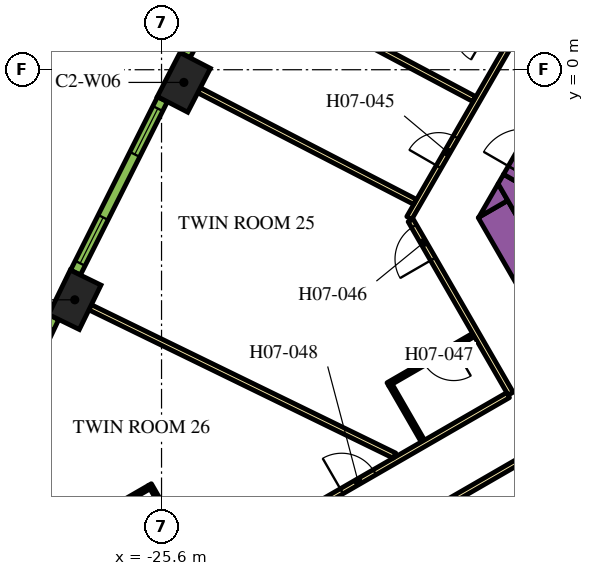
"""IFC4 building model, lengths in metres.
Left out: names, types, materials, properties, quantities, classifications, styles, units other than length and angle.
Written with IfcOpenShell. Run it as: python <this file> out.ifc"""

import sys

from ifc_helpers import new_model, si_unit, direction, frame, frame_2d, origin, origin_2d, place, context, subcontext, project, spatial, polyline, rectangle, outline, extrude, element, fill, save


model = new_model("IFC4")
c1 = context("Model", 3, precision=1e-05, world=origin(), true_north=direction((0.0, 1.0)))
c2 = subcontext(c1, "Body", "Model", "MODEL_VIEW")
j1 = project(units=[si_unit("LENGTHUNIT", "METRE"), si_unit("PLANEANGLEUNIT", "RADIAN")], contexts=[c1])
p1 = place(None, origin())
s1 = spatial("IfcSite", under=j1, at=p1, CompositionType="ELEMENT")
p2 = place(p1, origin())
s2 = spatial("IfcBuilding", under=s1, at=p2, CompositionType="ELEMENT")
p3 = place(p2, frame((0.0, 0.0, 95.4)))
s3 = spatial("IfcBuildingStorey", under=s2, at=p3, CompositionType="ELEMENT", Elevation=95.4)
for number, where, z_axis, x_axis in (
    (1, (-25.012, -0.334, 0.0), (0.0, 0.0, 1.0), (-0.459, -0.888, 0.0)),
    (2, (-27.883, -6.054, 0.0), (0.0, 0.0, 1.0), (-0.438, -0.899, 0.0)),
):
    element("IfcColumn", number, at=place(p3, frame(where, z_axis=z_axis, x_axis=x_axis)), inside=s3, PredefinedType="COLUMN", context=c2, shape_type="SweptSolid", body=[
        extrude(rectangle(XDim=1.3, YDim=0.9, at=origin_2d()), origin(), (0.0, 0.0, 1.0), 3.9),
    ])
p4 = place(p3, frame((-12.134, -11.883, 0.0), z_axis=(0.0, 0.0, 1.0), x_axis=(-0.500005339912, 0.866022320763, 0.0)))
e3 = element("IfcWall", 3, at=p4, inside=s3, PredefinedType="SOLIDWALL", context=c2, shape_type="SweptSolid", body=[
    extrude(rectangle(XDim=9.488, YDim=0.9, at=frame_2d((4.744, 0.0))), origin(), (0.0, 0.0, 1.0), 3.9),
])
p5 = place(p3, origin())
e4 = element("IfcWall", 4, at=p5, inside=s3, PredefinedType="SOLIDWALL", context=c2, shape_type="SweptSolid", body=[
    extrude(outline(polyline([(-16.489, -3.44), (-17.251, -3.88), (-16.743, -3.0), (-16.489, -3.44)])), origin(), (0.0, 0.0, 1.0), 3.9),
])
e5 = element("IfcWall", 5, at=p5, inside=s3, PredefinedType="SOLIDWALL", context=c2, shape_type="SweptSolid", body=[
    extrude(outline(polyline([(-15.82, -3.201), (-16.223, -3.9), (-16.743, -3.0), (-16.599, -2.751), (-15.82, -3.201)])), origin(), (0.0, 0.0, 1.0), 3.9),
])
p6 = place(p3, frame((-16.209, -2.976, 0.0), z_axis=(0.0, 0.0, 1.0), x_axis=(0.499954529098, 0.86605165483, 0.0)))
e6 = element("IfcWall", 6, at=p6, inside=s3, PredefinedType="SOLIDWALL", context=c2, shape_type="SweptSolid", body=[
    extrude(rectangle(XDim=1.7, YDim=0.9, at=frame_2d((0.85, 0.0))), origin(), (0.0, 0.0, 1.0), 3.9),
])
p7 = place(p6, frame((0.25, 0.0, 0.0)))
e7 = element("IfcOpeningElement", 7, at=p7, cuts=e6, PredefinedType="OPENING", context=c2, shape_type="SweptSolid", body=[
    extrude(rectangle(XDim=1.2, YDim=2.1, at=frame_2d((0.6, 1.05))), frame((0.0, 0.46, 0.0), z_axis=(0.0, -1.0, 0.0), x_axis=(1.0, 0.0, 0.0)), (0.0, 0.0, 1.0), 0.92),
])
p8 = place(p3, frame((-19.081, -3.9, 0.0), z_axis=(0.0, 0.0, 1.0), x_axis=(0.499998313975, 0.866026377209, 0.0)))
e8 = element("IfcWall", 8, at=p8, inside=s3, PredefinedType="PARTITIONING", context=c2, shape_type="SweptSolid", body=[
    extrude(rectangle(XDim=25.766, YDim=0.15, at=frame_2d((12.883, 0.0))), origin(), (0.0, 0.0, 1.0), 2.75),
])
p9 = place(p8, frame((19.306, 0.0, 0.0)))
e9 = element("IfcOpeningElement", 9, at=p9, cuts=e8, PredefinedType="OPENING", context=c2, shape_type="SweptSolid", body=[
    extrude(rectangle(XDim=1.0, YDim=2.1, at=frame_2d((0.5, 1.05))), frame((0.0, 0.085, 0.0), z_axis=(0.0, -1.0, 0.0), x_axis=(1.0, 0.0, 0.0)), (0.0, 0.0, 1.0), 0.17),
])
p10 = place(p8, frame((17.144, 0.0, 0.0)))
e10 = element("IfcOpeningElement", 10, at=p10, cuts=e8, PredefinedType="OPENING", context=c2, shape_type="SweptSolid", body=[
    extrude(rectangle(XDim=0.9, YDim=2.1, at=frame_2d((0.45, 1.05))), frame((0.0, 0.085, 0.0), z_axis=(0.0, -1.0, 0.0), x_axis=(1.0, 0.0, 0.0)), (0.0, 0.0, 1.0), 0.17),
])
p11 = place(p8, frame((9.955, 0.0, 0.0)))
e11 = element("IfcOpeningElement", 11, at=p11, cuts=e8, PredefinedType="OPENING", context=c2, shape_type="SweptSolid", body=[
    extrude(rectangle(XDim=1.1, YDim=2.1, at=frame_2d((0.55, 1.05))), frame((0.0, 0.085, 0.0), z_axis=(0.0, -1.0, 0.0), x_axis=(1.0, 0.0, 0.0)), (0.0, 0.0, 1.0), 0.17),
])
p12 = place(p8, frame((8.648, 0.0, 0.0)))
e12 = element("IfcOpeningElement", 12, at=p12, cuts=e8, PredefinedType="OPENING", context=c2, shape_type="SweptSolid", body=[
    extrude(rectangle(XDim=1.0, YDim=2.1, at=frame_2d((0.5, 1.05))), frame((0.0, 0.085, 0.0), z_axis=(0.0, -1.0, 0.0), x_axis=(1.0, 0.0, 0.0)), (0.0, 0.0, 1.0), 0.17),
])
p13 = place(p8, frame((1.553, 0.0, 0.0)))
e13 = element("IfcOpeningElement", 13, at=p13, cuts=e8, PredefinedType="OPENING", context=c2, shape_type="SweptSolid", body=[
    extrude(rectangle(XDim=0.9, YDim=2.1, at=frame_2d((0.45, 1.05))), frame((0.0, 0.085, 0.0), z_axis=(0.0, -1.0, 0.0), x_axis=(1.0, 0.0, 0.0)), (0.0, 0.0, 1.0), 0.17),
])
p14 = place(p3, frame((-16.412, -8.523, 0.0), z_axis=(0.0, 0.0, 1.0), x_axis=(-0.500001929737, 0.866024289647, 0.0)))
e14 = element("IfcWall", 14, at=p14, inside=s3, PredefinedType="PARTITIONING", context=c2, shape_type="SweptSolid", body=[
    extrude(rectangle(XDim=5.268, YDim=0.15, at=frame_2d((2.634, 0.0))), origin(), (0.0, 0.0, 1.0), 2.75),
])
p15 = place(p14, frame((4.088, 0.0, 0.0)))
e15 = element("IfcOpeningElement", 15, at=p15, cuts=e14, PredefinedType="OPENING", context=c2, shape_type="SweptSolid", body=[
    extrude(rectangle(XDim=1.0, YDim=2.1, at=frame_2d((0.5, 1.05))), frame((0.0, 0.085, 0.0), z_axis=(0.0, -1.0, 0.0), x_axis=(1.0, 0.0, 0.0)), (0.0, 0.0, 1.0), 0.17),
])
p16 = place(p3, frame((-28.211, -15.335, 0.0), z_axis=(0.0, 0.0, 1.0), x_axis=(0.866025884867, 0.49999916674, 0.0)))
e16 = element("IfcWall", 16, at=p16, inside=s3, PredefinedType="PARTITIONING", context=c2, shape_type="SweptSolid", body=[
    extrude(rectangle(XDim=13.543, YDim=0.15, at=frame_2d((6.772, 0.0))), origin(), (0.0, 0.0, 1.0), 2.75),
])
p17 = place(p16, frame((8.488, 0.0, 0.0)))
e17 = element("IfcOpeningElement", 17, at=p17, cuts=e16, PredefinedType="OPENING", context=c2, shape_type="SweptSolid", body=[
    extrude(rectangle(XDim=1.0, YDim=2.1, at=frame_2d((0.5, 1.05))), frame((0.0, 0.085, 0.0), z_axis=(0.0, -1.0, 0.0), x_axis=(1.0, 0.0, 0.0)), (0.0, 0.0, 1.0), 0.17),
])
p18 = place(p3, frame((-15.587, -9.952, 0.0), z_axis=(0.0, 0.0, 1.0), x_axis=(-0.866017869832, -0.500013048961, 0.0)))
e18 = element("IfcWall", 18, at=p18, inside=s3, PredefinedType="PARTITIONING", context=c2, shape_type="SweptSolid", body=[
    extrude(rectangle(XDim=13.624, YDim=0.15, at=frame_2d((6.812, 0.0))), origin(), (0.0, 0.0, 1.0), 2.75),
])
p19 = place(p18, frame((4.134, 0.0, 0.0)))
e19 = element("IfcOpeningElement", 19, at=p19, cuts=e18, PredefinedType="OPENING", context=c2, shape_type="SweptSolid", body=[
    extrude(rectangle(XDim=1.0, YDim=2.1, at=frame_2d((0.5, 1.05))), frame((0.0, 0.085, 0.0), z_axis=(0.0, -1.0, 0.0), x_axis=(1.0, 0.0, 0.0)), (0.0, 0.0, 1.0), 0.17),
])
p20 = place(p3, frame((-27.479, -6.251, 0.0), z_axis=(0.0, 0.0, 1.0), x_axis=(0.898945877276, -0.438059710231, 0.0)))
e20 = element("IfcWall", 20, at=p20, inside=s3, PredefinedType="PARTITIONING", context=c2, shape_type="SweptSolid", body=[
    extrude(rectangle(XDim=8.909, YDim=0.15, at=frame_2d((4.455, 0.0))), origin(), (0.0, 0.0, 1.0), 2.75),
])
p21 = place(p3, frame((-24.613, -0.541, 0.0), z_axis=(0.0, 0.0, 1.0), x_axis=(0.888459912519, -0.458954228487, 0.0)))
e21 = element("IfcWall", 21, at=p21, inside=s3, PredefinedType="PARTITIONING", context=c2, shape_type="SweptSolid", body=[
    extrude(rectangle(XDim=6.392, YDim=0.15, at=frame_2d((3.196, 0.0))), origin(), (0.0, 0.0, 1.0), 2.75),
])
p22 = place(p3, frame((-23.652, 2.567, 0.0), z_axis=(0.0, 0.0, 1.0), x_axis=(0.883019237957, -0.469336793144, 0.0)))
e22 = element("IfcWall", 22, at=p22, inside=s3, PredefinedType="PARTITIONING", context=c2, shape_type="SweptSolid", body=[
    extrude(rectangle(XDim=7.111, YDim=0.15, at=frame_2d((3.555, 0.0))), origin(), (0.0, 0.0, 1.0), 2.75),
])
p23 = place(p3, frame((-17.39, -6.979, 0.0), z_axis=(0.0, 0.0, 1.0), x_axis=(-0.866021400173, -0.500006934395, 0.0)))
e23 = element("IfcWall", 23, at=p23, inside=s3, PredefinedType="PARTITIONING", context=c2, shape_type="SweptSolid", body=[
    extrude(rectangle(XDim=2.6, YDim=0.1, at=frame_2d((1.3, 0.0))), origin(), (0.0, 0.0, 1.0), 2.75),
])
p24 = place(p23, frame((0.6, 0.0, 0.0)))
e24 = element("IfcOpeningElement", 24, at=p24, cuts=e23, PredefinedType="OPENING", context=c2, shape_type="SweptSolid", body=[
    extrude(rectangle(XDim=0.9, YDim=2.1, at=frame_2d((0.45, 1.05))), frame((0.0, 0.06, 0.0), z_axis=(0.0, -1.0, 0.0), x_axis=(1.0, 0.0, 0.0)), (0.0, 0.0, 1.0), 0.12),
])
p25 = place(p3, frame((-19.574, -8.297, 0.0), z_axis=(0.0, 0.0, 1.0), x_axis=(0.500062241894, -0.865989465428, 0.0)))
e25 = element("IfcWall", 25, at=p25, inside=s3, PredefinedType="PARTITIONING", context=c2, shape_type="SweptSolid", body=[
    extrude(rectangle(XDim=1.7, YDim=0.1, at=frame_2d((0.85, 0.0))), origin(), (0.0, 0.0, 1.0), 2.75),
])
p26 = place(p3, frame((-24.61, -13.169, 0.0), z_axis=(0.0, 0.0, 1.0), x_axis=(-0.500006934395, 0.866021400173, 0.0)))
e26 = element("IfcWall", 26, at=p26, inside=s3, PredefinedType="PARTITIONING", context=c2, shape_type="SweptSolid", body=[
    extrude(rectangle(XDim=2.6, YDim=0.1, at=frame_2d((1.3, 0.0))), origin(), (0.0, 0.0, 1.0), 2.75),
])
p27 = place(p26, frame((0.6, 0.0, 0.0)))
e27 = element("IfcOpeningElement", 27, at=p27, cuts=e26, PredefinedType="OPENING", context=c2, shape_type="SweptSolid", body=[
    extrude(rectangle(XDim=0.9, YDim=2.1, at=frame_2d((0.45, 1.05))), frame((0.0, 0.06, 0.0), z_axis=(0.0, -1.0, 0.0), x_axis=(1.0, 0.0, 0.0)), (0.0, 0.0, 1.0), 0.12),
])
p28 = place(p3, frame((-25.928, -10.986, 0.0), z_axis=(0.0, 0.0, 1.0), x_axis=(-0.865989465428, -0.500062241894, 0.0)))
e28 = element("IfcWall", 28, at=p28, inside=s3, PredefinedType="PARTITIONING", context=c2, shape_type="SweptSolid", body=[
    extrude(rectangle(XDim=1.7, YDim=0.1, at=frame_2d((0.85, 0.0))), origin(), (0.0, 0.0, 1.0), 2.75),
])
p29 = place(p3, frame((-22.583, 4.887, 0.0), z_axis=(0.0, 0.0, 1.0), x_axis=(-0.469323203119, -0.883026461106, 0.0)))
e29 = element("IfcWall", 29, at=p29, inside=s3, PredefinedType="SOLIDWALL", context=c2, shape_type="SweptSolid", body=[
    extrude(rectangle(XDim=5.101, YDim=0.29, at=frame_2d((2.55, 0.0))), origin(), (0.0, 0.0, 1.0), 3.65),
])
p30 = place(p29, frame((0.273, 0.0, 0.9)))
e30 = element("IfcOpeningElement", 30, at=p30, cuts=e29, PredefinedType="OPENING", context=c2, shape_type="SweptSolid", body=[
    extrude(rectangle(XDim=1.35, YDim=2.15, at=frame_2d((0.675, 1.075))), frame((0.0, 0.155, 0.0), z_axis=(0.0, -1.0, 0.0), x_axis=(1.0, 0.0, 0.0)), (0.0, 0.0, 1.0), 0.31),
])
p31 = place(p29, frame((3.478, 0.0, 0.9)))
e31 = element("IfcOpeningElement", 31, at=p31, cuts=e29, PredefinedType="OPENING", context=c2, shape_type="SweptSolid", body=[
    extrude(rectangle(XDim=1.35, YDim=2.15, at=frame_2d((0.675, 1.075))), frame((0.0, 0.155, 0.0), z_axis=(0.0, -1.0, 0.0), x_axis=(1.0, 0.0, 0.0)), (0.0, 0.0, 1.0), 0.31),
])
p32 = place(p3, frame((-25.576, -0.778, 0.0), z_axis=(0.0, 0.0, 1.0), x_axis=(-0.448534297211, -0.893765620409, 0.0)))
e32 = element("IfcWall", 32, at=p32, inside=s3, PredefinedType="SOLIDWALL", context=c2, shape_type="SweptSolid", body=[
    extrude(rectangle(XDim=5.1, YDim=0.29, at=frame_2d((2.55, 0.0))), origin(), (0.0, 0.0, 1.0), 3.65),
])
p33 = place(p32, frame((0.272, 0.0, 0.9)))
e33 = element("IfcOpeningElement", 33, at=p33, cuts=e32, PredefinedType="OPENING", context=c2, shape_type="SweptSolid", body=[
    extrude(rectangle(XDim=1.35, YDim=2.15, at=frame_2d((0.675, 1.075))), frame((0.0, 0.155, 0.0), z_axis=(0.0, -1.0, 0.0), x_axis=(1.0, 0.0, 0.0)), (0.0, 0.0, 1.0), 0.31),
])
p34 = place(p32, frame((3.478, 0.0, 0.9)))
e34 = element("IfcOpeningElement", 34, at=p34, cuts=e32, PredefinedType="OPENING", context=c2, shape_type="SweptSolid", body=[
    extrude(rectangle(XDim=1.35, YDim=2.15, at=frame_2d((0.675, 1.075))), frame((0.0, 0.155, 0.0), z_axis=(0.0, -1.0, 0.0), x_axis=(1.0, 0.0, 0.0)), (0.0, 0.0, 1.0), 0.31),
])
p35 = place(p3, frame((-28.436, -6.511, 0.0), z_axis=(0.0, 0.0, 1.0), x_axis=(-0.427543726596, -0.903994669148, 0.0)))
e35 = element("IfcWall", 35, at=p35, inside=s3, PredefinedType="SOLIDWALL", context=c2, shape_type="SweptSolid", body=[
    extrude(rectangle(XDim=5.107, YDim=0.29, at=frame_2d((2.553, 0.0))), origin(), (0.0, 0.0, 1.0), 3.65),
])
p36 = place(p35, frame((0.285, 0.0, 0.9)))
e36 = element("IfcOpeningElement", 36, at=p36, cuts=e35, PredefinedType="OPENING", context=c2, shape_type="SweptSolid", body=[
    extrude(rectangle(XDim=1.35, YDim=2.15, at=frame_2d((0.675, 1.075))), frame((0.0, 0.155, 0.0), z_axis=(0.0, -1.0, 0.0), x_axis=(1.0, 0.0, 0.0)), (0.0, 0.0, 1.0), 0.31),
])
p37 = place(p35, frame((3.516, 0.0, 0.9)))
e37 = element("IfcOpeningElement", 37, at=p37, cuts=e35, PredefinedType="OPENING", context=c2, shape_type="SweptSolid", body=[
    extrude(rectangle(XDim=1.35, YDim=2.15, at=frame_2d((0.675, 1.075))), frame((0.0, 0.155, 0.0), z_axis=(0.0, -1.0, 0.0), x_axis=(1.0, 0.0, 0.0)), (0.0, 0.0, 1.0), 0.31),
])
p38 = place(p13, origin())
e38 = element("IfcDoor", 38, at=p38, inside=s3, OperationType="SINGLE_SWING_RIGHT", PredefinedType="DOOR", context=c2, shape_type="SweptSolid", body=[
    extrude(rectangle(XDim=0.9, YDim=2.1, at=frame_2d((0.45, 1.05))), frame((0.0, 0.025, 0.0), z_axis=(0.0, -1.0, 0.0), x_axis=(1.0, 0.0, 0.0)), (0.0, 0.0, 1.0), 0.05),
])
fill(e13, e38)
p39 = place(p15, origin())
e39 = element("IfcDoor", 39, at=p39, inside=s3, OperationType="SINGLE_SWING_RIGHT", PredefinedType="DOOR", context=c2, shape_type="SweptSolid", body=[
    extrude(rectangle(XDim=1.0, YDim=2.1, at=frame_2d((0.5, 1.05))), frame((0.0, 0.025, 0.0), z_axis=(0.0, -1.0, 0.0), x_axis=(1.0, 0.0, 0.0)), (0.0, 0.0, 1.0), 0.05),
])
fill(e15, e39)
p40 = place(p24, origin())
e40 = element("IfcDoor", 40, at=p40, inside=s3, OperationType="SINGLE_SWING_LEFT", PredefinedType="DOOR", context=c2, shape_type="SweptSolid", body=[
    extrude(rectangle(XDim=0.9, YDim=2.1, at=frame_2d((0.45, 1.05))), frame((0.0, 0.025, 0.0), z_axis=(0.0, -1.0, 0.0), x_axis=(1.0, 0.0, 0.0)), (0.0, 0.0, 1.0), 0.05),
])
fill(e24, e40)
p41 = place(p17, origin())
e41 = element("IfcDoor", 41, at=p41, inside=s3, OperationType="SINGLE_SWING_RIGHT", PredefinedType="DOOR", context=c2, shape_type="SweptSolid", body=[
    extrude(rectangle(XDim=1.0, YDim=2.1, at=frame_2d((0.5, 1.05))), frame((0.0, 0.025, 0.0), z_axis=(0.0, -1.0, 0.0), x_axis=(1.0, 0.0, 0.0)), (0.0, 0.0, 1.0), 0.05),
])
fill(e17, e41)
p42 = place(p33, origin())
e42 = element("IfcWindow", 42, at=p42, inside=s3, PartitioningType="DOUBLE_PANEL_VERTICAL", PredefinedType="WINDOW", context=c2, shape_type="SweptSolid", body=[
    extrude(rectangle(XDim=1.35, YDim=2.15, at=frame_2d((0.675, 1.075))), frame((0.0, 0.015, 0.0), z_axis=(0.0, -1.0, 0.0), x_axis=(1.0, 0.0, 0.0)), (0.0, 0.0, 1.0), 0.06),
])
fill(e33, e42)
p43 = place(p34, origin())
e43 = element("IfcWindow", 43, at=p43, inside=s3, PartitioningType="DOUBLE_PANEL_VERTICAL", PredefinedType="WINDOW", context=c2, shape_type="SweptSolid", body=[
    extrude(rectangle(XDim=1.35, YDim=2.15, at=frame_2d((0.675, 1.075))), frame((0.0, 0.015, 0.0), z_axis=(0.0, -1.0, 0.0), x_axis=(1.0, 0.0, 0.0)), (0.0, 0.0, 1.0), 0.06),
])
fill(e34, e43)
save(model, sys.argv[1])
